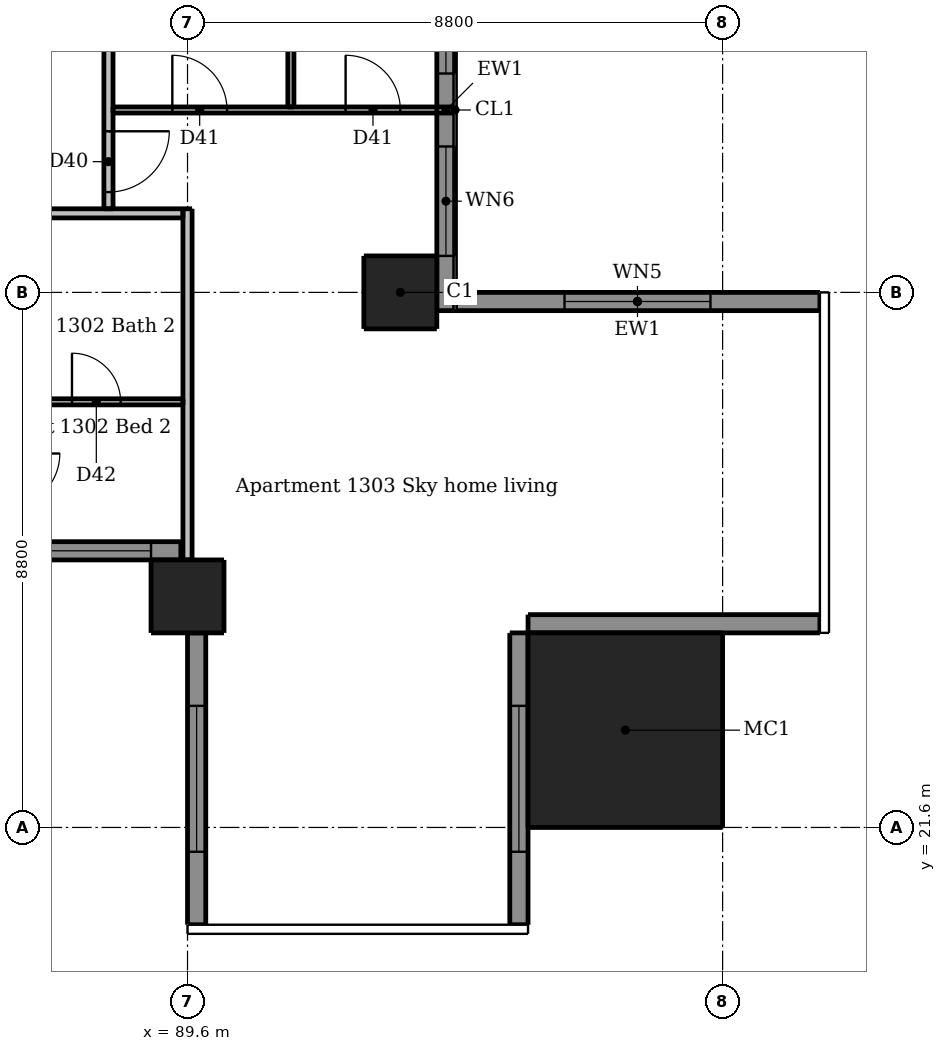
"""IFC4 building model, lengths in metres.
Left out: names, types, materials, properties, quantities, classifications, styles, units other than length and angle.
Written with IfcOpenShell. Run it as: python <this file> out.ifc"""

import sys

from ifc_helpers import new_model, si_unit, direction, frame, frame_2d, origin, origin_2d, place, context, subcontext, project, spatial, rectangle, extrude, element, fill, save


model = new_model("IFC4")
c1 = context("Model", 3, precision=1e-05, world=origin(), true_north=direction((0.0, 1.0)))
c2 = subcontext(c1, "Body", "Model", "MODEL_VIEW")
j1 = project(units=[si_unit("LENGTHUNIT", "METRE"), si_unit("PLANEANGLEUNIT", "RADIAN")], contexts=[c1])
p1 = place(None, origin())
s1 = spatial("IfcSite", under=j1, at=p1, CompositionType="ELEMENT")
p2 = place(p1, origin())
s2 = spatial("IfcBuilding", under=s1, at=p2, CompositionType="ELEMENT")
p3 = place(p2, frame((0.0, 0.0, 49.9)))
s3 = spatial("IfcBuildingStorey", under=s2, at=p3, CompositionType="ELEMENT", Elevation=49.9)
for number, where, z_axis, x_axis in (
    (1, (89.6, 25.4, 0.0), (0.0, 0.0, 1.0), (1.0, 0.0, 0.0)),
    (2, (93.1, 30.4, 0.0), (0.0, 0.0, 1.0), (1.0, 0.0, 0.0)),
):
    element("IfcColumn", number, at=place(p3, frame(where, z_axis=z_axis, x_axis=x_axis)), inside=s3, PredefinedType="COLUMN", context=c2, shape_type="SweptSolid", body=[
        extrude(rectangle(XDim=1.2, YDim=1.2, at=origin_2d()), origin(), (0.0, 0.0, 1.0), 3.05),
    ])
p4 = place(p3, frame((96.8, 23.2, 0.0), z_axis=(0.0, 0.0, 1.0), x_axis=(1.0, 0.0, 0.0)))
e3 = element("IfcColumn", 3, at=p4, inside=s3, PredefinedType="COLUMN", context=c2, shape_type="SweptSolid", body=[
    extrude(rectangle(XDim=3.2, YDim=3.2, at=origin_2d()), origin(), (0.0, 0.0, 1.0), 3.3),
])
p5 = place(p3, frame((89.75, 24.8, 0.0), z_axis=(0.0, 0.0, 1.0), x_axis=(0.0, -1.0, 0.0)))
e4 = element("IfcWall", 4, at=p5, inside=s3, PredefinedType="SOLIDWALL", context=c2, shape_type="SweptSolid", body=[
    extrude(rectangle(XDim=4.8, YDim=0.3, at=frame_2d((2.4, 0.0))), origin(), (0.0, 0.0, 1.0), 3.05),
])
p6 = place(p5, frame((1.2, 0.0, 0.15)))
e5 = element("IfcOpeningElement", 5, at=p6, cuts=e4, PredefinedType="OPENING", context=c2, shape_type="SweptSolid", body=[
    extrude(rectangle(XDim=2.4, YDim=2.1, at=frame_2d((1.2, 1.05))), frame((0.0, 0.16, 0.0), z_axis=(0.0, -1.0, 0.0), x_axis=(1.0, 0.0, 0.0)), (0.0, 0.0, 1.0), 0.32),
])
p7 = place(p3, frame((95.05, 20.0, 0.0), z_axis=(0.0, 0.0, 1.0), x_axis=(0.0, 1.0, 0.0)))
e6 = element("IfcWall", 6, at=p7, inside=s3, PredefinedType="SOLIDWALL", context=c2, shape_type="SweptSolid", body=[
    extrude(rectangle(XDim=4.8, YDim=0.3, at=frame_2d((2.4, 0.0))), origin(), (0.0, 0.0, 1.0), 3.05),
])
p8 = place(p7, frame((1.2, 0.0, 0.15)))
e7 = element("IfcOpeningElement", 7, at=p8, cuts=e6, PredefinedType="OPENING", context=c2, shape_type="SweptSolid", body=[
    extrude(rectangle(XDim=2.4, YDim=2.1, at=frame_2d((1.2, 1.05))), frame((0.0, 0.16, 0.0), z_axis=(0.0, -1.0, 0.0), x_axis=(1.0, 0.0, 0.0)), (0.0, 0.0, 1.0), 0.32),
])
p9 = place(p3, frame((95.2, 24.95, 0.0), z_axis=(0.0, 0.0, 1.0), x_axis=(1.0, 0.0, 0.0)))
e8 = element("IfcWall", 8, at=p9, inside=s3, PredefinedType="SOLIDWALL", context=c2, shape_type="SweptSolid", body=[
    extrude(rectangle(XDim=4.8, YDim=0.3, at=frame_2d((2.4, 0.0))), origin(), (0.0, 0.0, 1.0), 3.05),
])
p10 = place(p3, frame((100.0, 30.25, 0.0), z_axis=(0.0, 0.0, 1.0), x_axis=(-1.0, 0.0, 0.0)))
e9 = element("IfcWall", 9, at=p10, inside=s3, PredefinedType="SOLIDWALL", context=c2, shape_type="SweptSolid", body=[
    extrude(rectangle(XDim=6.0, YDim=0.3, at=frame_2d((3.0, 0.0))), origin(), (0.0, 0.0, 1.0), 3.05),
])
p11 = place(p10, frame((1.8, 0.0, 0.15)))
e10 = element("IfcOpeningElement", 10, at=p11, cuts=e9, PredefinedType="OPENING", context=c2, shape_type="SweptSolid", body=[
    extrude(rectangle(XDim=2.4, YDim=2.1, at=frame_2d((1.2, 1.05))), frame((0.0, 0.16, 0.0), z_axis=(0.0, -1.0, 0.0), x_axis=(1.0, 0.0, 0.0)), (0.0, 0.0, 1.0), 0.32),
])
p12 = place(p3, frame((83.6, 26.15, 0.0), z_axis=(0.0, 0.0, 1.0), x_axis=(1.0, 0.0, 0.0)))
e11 = element("IfcWall", 11, at=p12, inside=s3, PredefinedType="SOLIDWALL", context=c2, shape_type="SweptSolid", body=[
    extrude(rectangle(XDim=5.89, YDim=0.3, at=frame_2d((2.945, 0.0))), origin(), (0.0, 0.0, 1.0), 3.05),
])
p13 = place(p12, frame((0.6, 0.0, 0.15)))
e12 = element("IfcOpeningElement", 12, at=p13, cuts=e11, PredefinedType="OPENING", context=c2, shape_type="SweptSolid", body=[
    extrude(rectangle(XDim=1.8, YDim=2.1, at=frame_2d((0.9, 1.05))), frame((0.0, 0.16, 0.0), z_axis=(0.0, -1.0, 0.0), x_axis=(1.0, 0.0, 0.0)), (0.0, 0.0, 1.0), 0.32),
])
p14 = place(p12, frame((3.6, 0.0, 0.15)))
e13 = element("IfcOpeningElement", 13, at=p14, cuts=e11, PredefinedType="OPENING", context=c2, shape_type="SweptSolid", body=[
    extrude(rectangle(XDim=1.8, YDim=2.1, at=frame_2d((0.9, 1.05))), frame((0.0, 0.16, 0.0), z_axis=(0.0, -1.0, 0.0), x_axis=(1.0, 0.0, 0.0)), (0.0, 0.0, 1.0), 0.32),
])
p15 = place(p3, frame((93.85, 30.1, 0.0), z_axis=(0.0, 0.0, 1.0), x_axis=(0.0, 1.0, 0.0)))
e14 = element("IfcWall", 14, at=p15, inside=s3, PredefinedType="SOLIDWALL", context=c2, shape_type="SweptSolid", body=[
    extrude(rectangle(XDim=6.6, YDim=0.3, at=frame_2d((3.3, 0.0))), origin(), (0.0, 0.0, 1.0), 3.05),
])
p16 = place(p15, frame((0.9, 0.0, 0.15)))
e15 = element("IfcOpeningElement", 15, at=p16, cuts=e14, PredefinedType="OPENING", context=c2, shape_type="SweptSolid", body=[
    extrude(rectangle(XDim=1.8, YDim=2.1, at=frame_2d((0.9, 1.05))), frame((0.0, 0.16, 0.0), z_axis=(0.0, -1.0, 0.0), x_axis=(1.0, 0.0, 0.0)), (0.0, 0.0, 1.0), 0.32),
])
p17 = place(p15, frame((3.9, 0.0, 0.15)))
e16 = element("IfcOpeningElement", 16, at=p17, cuts=e14, PredefinedType="OPENING", context=c2, shape_type="SweptSolid", body=[
    extrude(rectangle(XDim=1.8, YDim=2.1, at=frame_2d((0.9, 1.05))), frame((0.0, 0.16, 0.0), z_axis=(0.0, -1.0, 0.0), x_axis=(1.0, 0.0, 0.0)), (0.0, 0.0, 1.0), 0.32),
])
p18 = place(p3, frame((91.3, 33.45, 0.0), z_axis=(0.0, 0.0, 1.0), x_axis=(0.0, 1.0, 0.0)))
e17 = element("IfcWall", 17, at=p18, inside=s3, PredefinedType="PARTITIONING", context=c2, shape_type="SweptSolid", body=[
    extrude(rectangle(XDim=5.975, YDim=0.1, at=frame_2d((2.988, 0.0))), origin(), (0.0, 0.0, 1.0), 3.05),
])
p19 = place(p18, frame((3.8, 0.0, 0.0)))
e18 = element("IfcOpeningElement", 18, at=p19, cuts=e17, PredefinedType="OPENING", context=c2, shape_type="SweptSolid", body=[
    extrude(rectangle(XDim=0.8, YDim=2.1, at=frame_2d((0.4, 1.05))), frame((0.0, 0.06, 0.0), z_axis=(0.0, -1.0, 0.0), x_axis=(1.0, 0.0, 0.0)), (0.0, 0.0, 1.0), 0.12),
])
p20 = place(p3, frame((88.375, 33.4, 0.0), z_axis=(0.0, 0.0, 1.0), x_axis=(1.0, 0.0, 0.0)))
e19 = element("IfcWall", 19, at=p20, inside=s3, PredefinedType="PARTITIONING", context=c2, shape_type="SweptSolid", body=[
    extrude(rectangle(XDim=5.625, YDim=0.1, at=frame_2d((2.812, 0.0))), origin(), (0.0, 0.0, 1.0), 3.05),
])
p21 = place(p20, frame((0.975, 0.0, 0.0)))
e20 = element("IfcOpeningElement", 20, at=p21, cuts=e19, PredefinedType="OPENING", context=c2, shape_type="SweptSolid", body=[
    extrude(rectangle(XDim=0.9, YDim=2.1, at=frame_2d((0.45, 1.05))), frame((0.0, 0.06, 0.0), z_axis=(0.0, -1.0, 0.0), x_axis=(1.0, 0.0, 0.0)), (0.0, 0.0, 1.0), 0.12),
])
p22 = place(p20, frame((3.825, 0.0, 0.0)))
e21 = element("IfcOpeningElement", 21, at=p22, cuts=e19, PredefinedType="OPENING", context=c2, shape_type="SweptSolid", body=[
    extrude(rectangle(XDim=0.9, YDim=2.1, at=frame_2d((0.45, 1.05))), frame((0.0, 0.06, 0.0), z_axis=(0.0, -1.0, 0.0), x_axis=(1.0, 0.0, 0.0)), (0.0, 0.0, 1.0), 0.12),
])
p23 = place(p3, frame((84.25, 28.6, 0.0), z_axis=(0.0, 0.0, 1.0), x_axis=(1.0, 0.0, 0.0)))
e22 = element("IfcWall", 22, at=p23, inside=s3, PredefinedType="PARTITIONING", context=c2, shape_type="SweptSolid", body=[
    extrude(rectangle(XDim=5.275, YDim=0.1, at=frame_2d((2.637, 0.0))), origin(), (0.0, 0.0, 1.0), 3.05),
])
p24 = place(p23, frame((3.45, 0.0, 0.0)))
e23 = element("IfcOpeningElement", 23, at=p24, cuts=e22, PredefinedType="OPENING", context=c2, shape_type="SweptSolid", body=[
    extrude(rectangle(XDim=0.8, YDim=2.1, at=frame_2d((0.4, 1.05))), frame((0.0, 0.06, 0.0), z_axis=(0.0, -1.0, 0.0), x_axis=(1.0, 0.0, 0.0)), (0.0, 0.0, 1.0), 0.12),
])
p25 = place(p3, frame((88.3, 60.475, 0.0), z_axis=(0.0, 0.0, 1.0), x_axis=(0.0, -1.0, 0.0)))
e24 = element("IfcWall", 24, at=p25, inside=s3, PredefinedType="PARTITIONING", context=c2, shape_type="SweptSolid", body=[
    extrude(rectangle(XDim=28.7, YDim=0.15, at=frame_2d((14.35, 0.0))), origin(), (0.0, 0.0, 1.0), 3.05),
])
p26 = place(p25, frame((27.425, 0.0, 0.0)))
e25 = element("IfcOpeningElement", 25, at=p26, cuts=e24, PredefinedType="OPENING", context=c2, shape_type="SweptSolid", body=[
    extrude(rectangle(XDim=1.0, YDim=2.1, at=frame_2d((0.5, 1.05))), frame((0.0, 0.085, 0.0), z_axis=(0.0, -1.0, 0.0), x_axis=(1.0, 0.0, 0.0)), (0.0, 0.0, 1.0), 0.17),
])
p27 = place(p25, frame((10.575, 0.0, 0.0)))
e26 = element("IfcOpeningElement", 26, at=p27, cuts=e24, PredefinedType="OPENING", context=c2, shape_type="SweptSolid", body=[
    extrude(rectangle(XDim=1.0, YDim=2.1, at=frame_2d((0.5, 1.05))), frame((0.0, 0.085, 0.0), z_axis=(0.0, -1.0, 0.0), x_axis=(1.0, 0.0, 0.0)), (0.0, 0.0, 1.0), 0.17),
])
p28 = place(p3, frame((89.6, 26.0, 0.0), z_axis=(0.0, 0.0, 1.0), x_axis=(0.0, 1.0, 0.0)))
e27 = element("IfcWall", 27, at=p28, inside=s3, PredefinedType="PARTITIONING", context=c2, shape_type="SweptSolid", body=[
    extrude(rectangle(XDim=5.775, YDim=0.15, at=frame_2d((2.887, 0.0))), origin(), (0.0, 0.0, 1.0), 2.516),
])
p29 = place(p3, frame((89.525, 31.7, 0.0), z_axis=(0.0, 0.0, 1.0), x_axis=(-1.0, 0.0, 0.0)))
e28 = element("IfcWall", 28, at=p29, inside=s3, PredefinedType="PARTITIONING", context=c2, shape_type="SweptSolid", body=[
    extrude(rectangle(XDim=28.75, YDim=0.15, at=frame_2d((14.375, 0.0))), origin(), (0.0, 0.0, 1.0), 3.05),
])
p30 = place(p29, frame((24.325, 0.0, 0.0)))
e29 = element("IfcOpeningElement", 29, at=p30, cuts=e28, PredefinedType="OPENING", context=c2, shape_type="SweptSolid", body=[
    extrude(rectangle(XDim=1.0, YDim=2.1, at=frame_2d((0.5, 1.05))), frame((0.0, 0.085, 0.0), z_axis=(0.0, -1.0, 0.0), x_axis=(1.0, 0.0, 0.0)), (0.0, 0.0, 1.0), 0.17),
])
p31 = place(p29, frame((6.575, 0.0, 0.0)))
e30 = element("IfcOpeningElement", 30, at=p31, cuts=e28, PredefinedType="OPENING", context=c2, shape_type="SweptSolid", body=[
    extrude(rectangle(XDim=1.0, YDim=2.1, at=frame_2d((0.5, 1.05))), frame((0.0, 0.085, 0.0), z_axis=(0.0, -1.0, 0.0), x_axis=(1.0, 0.0, 0.0)), (0.0, 0.0, 1.0), 0.17),
])
p32 = place(p6, origin())
e31 = element("IfcWindow", 31, at=p32, inside=s3, PartitioningType="DOUBLE_PANEL_VERTICAL", PredefinedType="WINDOW", context=c2, shape_type="SweptSolid", body=[
    extrude(rectangle(XDim=2.4, YDim=2.1, at=frame_2d((1.2, 1.05))), frame((0.0, 0.03, 0.0), z_axis=(0.0, -1.0, 0.0), x_axis=(1.0, 0.0, 0.0)), (0.0, 0.0, 1.0), 0.06),
])
fill(e5, e31)
p33 = place(p8, origin())
e32 = element("IfcWindow", 32, at=p33, inside=s3, PartitioningType="DOUBLE_PANEL_VERTICAL", PredefinedType="WINDOW", context=c2, shape_type="SweptSolid", body=[
    extrude(rectangle(XDim=2.4, YDim=2.1, at=frame_2d((1.2, 1.05))), frame((0.0, 0.03, 0.0), z_axis=(0.0, -1.0, 0.0), x_axis=(1.0, 0.0, 0.0)), (0.0, 0.0, 1.0), 0.06),
])
fill(e7, e32)
p34 = place(p11, origin())
e33 = element("IfcWindow", 33, at=p34, inside=s3, PartitioningType="DOUBLE_PANEL_VERTICAL", PredefinedType="WINDOW", context=c2, shape_type="SweptSolid", body=[
    extrude(rectangle(XDim=2.4, YDim=2.1, at=frame_2d((1.2, 1.05))), frame((0.0, 0.03, 0.0), z_axis=(0.0, -1.0, 0.0), x_axis=(1.0, 0.0, 0.0)), (0.0, 0.0, 1.0), 0.06),
])
fill(e10, e33)
p35 = place(p14, origin())
e34 = element("IfcWindow", 34, at=p35, inside=s3, PartitioningType="DOUBLE_PANEL_VERTICAL", PredefinedType="WINDOW", context=c2, shape_type="SweptSolid", body=[
    extrude(rectangle(XDim=1.8, YDim=2.1, at=frame_2d((0.9, 1.05))), frame((0.0, 0.03, 0.0), z_axis=(0.0, -1.0, 0.0), x_axis=(1.0, 0.0, 0.0)), (0.0, 0.0, 1.0), 0.06),
])
fill(e13, e34)
p36 = place(p16, origin())
e35 = element("IfcWindow", 35, at=p36, inside=s3, PartitioningType="DOUBLE_PANEL_VERTICAL", PredefinedType="WINDOW", context=c2, shape_type="SweptSolid", body=[
    extrude(rectangle(XDim=1.8, YDim=2.1, at=frame_2d((0.9, 1.05))), frame((0.0, 0.03, 0.0), z_axis=(0.0, -1.0, 0.0), x_axis=(1.0, 0.0, 0.0)), (0.0, 0.0, 1.0), 0.06),
])
fill(e15, e35)
p37 = place(p17, origin())
e36 = element("IfcWindow", 36, at=p37, inside=s3, PartitioningType="DOUBLE_PANEL_VERTICAL", PredefinedType="WINDOW", context=c2, shape_type="SweptSolid", body=[
    extrude(rectangle(XDim=1.8, YDim=2.1, at=frame_2d((0.9, 1.05))), frame((0.0, 0.03, 0.0), z_axis=(0.0, -1.0, 0.0), x_axis=(1.0, 0.0, 0.0)), (0.0, 0.0, 1.0), 0.06),
])
fill(e16, e36)
p38 = place(p24, origin())
e37 = element("IfcDoor", 37, at=p38, inside=s3, OperationType="SINGLE_SWING_LEFT", PredefinedType="DOOR", context=c2, shape_type="SweptSolid", body=[
    extrude(rectangle(XDim=0.8, YDim=2.1, at=frame_2d((0.4, 1.05))), frame((0.0, 0.025, 0.0), z_axis=(0.0, -1.0, 0.0), x_axis=(1.0, 0.0, 0.0)), (0.0, 0.0, 1.0), 0.05),
])
fill(e23, e37)
p39 = place(p26, origin())
e38 = element("IfcDoor", 38, at=p39, inside=s3, OperationType="SINGLE_SWING_LEFT", PredefinedType="DOOR", context=c2, shape_type="SweptSolid", body=[
    extrude(rectangle(XDim=1.0, YDim=2.1, at=frame_2d((0.5, 1.05))), frame((0.0, 0.025, 0.0), z_axis=(0.0, -1.0, 0.0), x_axis=(1.0, 0.0, 0.0)), (0.0, 0.0, 1.0), 0.05),
])
fill(e25, e38)
p40 = place(p21, origin())
e39 = element("IfcDoor", 39, at=p40, inside=s3, OperationType="SINGLE_SWING_LEFT", PredefinedType="DOOR", context=c2, shape_type="SweptSolid", body=[
    extrude(rectangle(XDim=0.9, YDim=2.1, at=frame_2d((0.45, 1.05))), frame((0.0, 0.025, 0.0), z_axis=(0.0, -1.0, 0.0), x_axis=(1.0, 0.0, 0.0)), (0.0, 0.0, 1.0), 0.05),
])
fill(e20, e39)
p41 = place(p22, origin())
e40 = element("IfcDoor", 40, at=p41, inside=s3, OperationType="SINGLE_SWING_LEFT", PredefinedType="DOOR", context=c2, shape_type="SweptSolid", body=[
    extrude(rectangle(XDim=0.9, YDim=2.1, at=frame_2d((0.45, 1.05))), frame((0.0, 0.025, 0.0), z_axis=(0.0, -1.0, 0.0), x_axis=(1.0, 0.0, 0.0)), (0.0, 0.0, 1.0), 0.05),
])
fill(e21, e40)
save(model, sys.argv[1])
